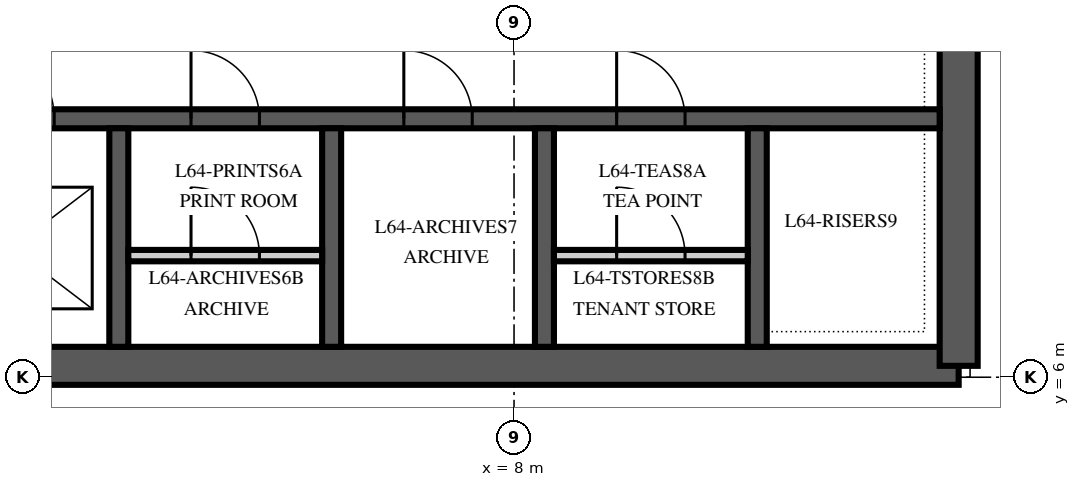
"""IFC4 building model, lengths in metres.
Left out: names, types, materials, properties, quantities, classifications, styles, units other than length and angle.
Written with IfcOpenShell. Run it as: python <this file> out.ifc"""

import sys

from ifc_helpers import new_model, si_unit, direction, frame, frame_2d, origin, place, context, subcontext, project, spatial, polyline, rectangle, outline, extrude, element, fill, save


model = new_model("IFC4")
c1 = context("Model", 3, precision=1e-05, world=origin(), true_north=direction((0.0, 1.0)))
c2 = subcontext(c1, "Body", "Model", "MODEL_VIEW")
j1 = project(units=[si_unit("LENGTHUNIT", "METRE"), si_unit("PLANEANGLEUNIT", "RADIAN")], contexts=[c1])
p1 = place(None, origin())
s1 = spatial("IfcSite", under=j1, at=p1, CompositionType="ELEMENT")
p2 = place(p1, origin())
s2 = spatial("IfcBuilding", under=s1, at=p2, CompositionType="ELEMENT")
p3 = place(p2, frame((0.0, 0.0, 276.0)))
s3 = spatial("IfcBuildingStorey", under=s2, at=p3, CompositionType="ELEMENT", Elevation=276.0)
p4 = place(p3, frame((-13.85, 6.15, 0.0), z_axis=(0.0, 0.0, 1.0), x_axis=(1.0, 0.0, 0.0)))
e1 = element("IfcWall", 1, at=p4, inside=s3, PredefinedType="SHEAR", context=c2, shape_type="SweptSolid", body=[
    extrude(rectangle(XDim=27.7, YDim=0.5, at=frame_2d((13.85, 0.0))), origin(), (0.0, 0.0, 1.0), 4.0),
])
p5 = place(p3, frame((13.85, 6.15, 0.0), z_axis=(0.0, 0.0, 1.0), x_axis=(0.0, 1.0, 0.0)))
e2 = element("IfcWall", 2, at=p5, inside=s3, PredefinedType="SHEAR", context=c2, shape_type="SweptSolid", body=[
    extrude(outline(polyline([(0.0, -0.25), (17.7, -0.25), (17.7, 0.0), (17.45, 0.0), (17.45, 0.25), (0.25, 0.25), (0.25, 0.0), (0.0, 0.0), (0.0, -0.25)])), origin(), (0.0, 0.0, 1.0), 4.0),
])
p6 = place(p5, frame((4.15, 0.0, 0.0)))
e3 = element("IfcOpeningElement", 3, at=p6, cuts=e2, PredefinedType="OPENING", context=c2, shape_type="SweptSolid", body=[
    extrude(rectangle(XDim=1.8, YDim=2.4, at=frame_2d((0.9, 1.2))), frame((0.0, 0.265, 0.0), z_axis=(0.0, -1.0, 0.0), x_axis=(1.0, 0.0, 0.0)), (0.0, 0.0, 1.0), 0.53),
])
p7 = place(p3, frame((-13.6, 9.4, 0.0), z_axis=(0.0, 0.0, 1.0), x_axis=(1.0, 0.0, 0.0)))
e4 = element("IfcWall", 4, at=p7, inside=s3, PredefinedType="SHEAR", context=c2, shape_type="SweptSolid", body=[
    extrude(rectangle(XDim=27.2, YDim=0.25, at=frame_2d((13.6, 0.0))), origin(), (0.0, 0.0, 1.0), 4.0),
])
p8 = place(p7, frame((8.85, 0.0, 0.0)))
e5 = element("IfcOpeningElement", 5, at=p8, cuts=e4, PredefinedType="OPENING", context=c2, shape_type="SweptSolid", body=[
    extrude(rectangle(XDim=1.1, YDim=2.1, at=frame_2d((0.55, 1.05))), frame((0.0, 0.14, 0.0), z_axis=(0.0, -1.0, 0.0), x_axis=(1.0, 0.0, 0.0)), (0.0, 0.0, 1.0), 0.28),
])
p9 = place(p7, frame((11.65, 0.0, 0.0)))
e6 = element("IfcOpeningElement", 6, at=p9, cuts=e4, PredefinedType="OPENING", context=c2, shape_type="SweptSolid", body=[
    extrude(rectangle(XDim=1.1, YDim=2.1, at=frame_2d((0.55, 1.05))), frame((0.0, 0.14, 0.0), z_axis=(0.0, -1.0, 0.0), x_axis=(1.0, 0.0, 0.0)), (0.0, 0.0, 1.0), 0.28),
])
p10 = place(p7, frame((14.45, 0.0, 0.0)))
e7 = element("IfcOpeningElement", 7, at=p10, cuts=e4, PredefinedType="OPENING", context=c2, shape_type="SweptSolid", body=[
    extrude(rectangle(XDim=1.1, YDim=2.1, at=frame_2d((0.55, 1.05))), frame((0.0, 0.14, 0.0), z_axis=(0.0, -1.0, 0.0), x_axis=(1.0, 0.0, 0.0)), (0.0, 0.0, 1.0), 0.28),
])
p11 = place(p7, frame((0.55, 0.0, 0.0)))
e8 = element("IfcOpeningElement", 8, at=p11, cuts=e4, PredefinedType="OPENING", context=c2, shape_type="SweptSolid", body=[
    extrude(rectangle(XDim=0.9, YDim=2.1, at=frame_2d((0.45, 1.05))), frame((0.0, 0.14, 0.0), z_axis=(0.0, -1.0, 0.0), x_axis=(1.0, 0.0, 0.0)), (0.0, 0.0, 1.0), 0.28),
])
p12 = place(p7, frame((3.35, 0.0, 0.0)))
e9 = element("IfcOpeningElement", 9, at=p12, cuts=e4, PredefinedType="OPENING", context=c2, shape_type="SweptSolid", body=[
    extrude(rectangle(XDim=0.9, YDim=2.1, at=frame_2d((0.45, 1.05))), frame((0.0, 0.14, 0.0), z_axis=(0.0, -1.0, 0.0), x_axis=(1.0, 0.0, 0.0)), (0.0, 0.0, 1.0), 0.28),
])
p13 = place(p7, frame((6.15, 0.0, 0.0)))
e10 = element("IfcOpeningElement", 10, at=p13, cuts=e4, PredefinedType="OPENING", context=c2, shape_type="SweptSolid", body=[
    extrude(rectangle(XDim=0.9, YDim=2.1, at=frame_2d((0.45, 1.05))), frame((0.0, 0.14, 0.0), z_axis=(0.0, -1.0, 0.0), x_axis=(1.0, 0.0, 0.0)), (0.0, 0.0, 1.0), 0.28),
])
p14 = place(p7, frame((17.35, 0.0, 0.0)))
e11 = element("IfcOpeningElement", 11, at=p14, cuts=e4, PredefinedType="OPENING", context=c2, shape_type="SweptSolid", body=[
    extrude(rectangle(XDim=0.9, YDim=2.1, at=frame_2d((0.45, 1.05))), frame((0.0, 0.14, 0.0), z_axis=(0.0, -1.0, 0.0), x_axis=(1.0, 0.0, 0.0)), (0.0, 0.0, 1.0), 0.28),
])
p15 = place(p7, frame((20.15, 0.0, 0.0)))
e12 = element("IfcOpeningElement", 12, at=p15, cuts=e4, PredefinedType="OPENING", context=c2, shape_type="SweptSolid", body=[
    extrude(rectangle(XDim=0.9, YDim=2.1, at=frame_2d((0.45, 1.05))), frame((0.0, 0.14, 0.0), z_axis=(0.0, -1.0, 0.0), x_axis=(1.0, 0.0, 0.0)), (0.0, 0.0, 1.0), 0.28),
])
p16 = place(p7, frame((22.95, 0.0, 0.0)))
e13 = element("IfcOpeningElement", 13, at=p16, cuts=e4, PredefinedType="OPENING", context=c2, shape_type="SweptSolid", body=[
    extrude(rectangle(XDim=0.9, YDim=2.1, at=frame_2d((0.45, 1.05))), frame((0.0, 0.14, 0.0), z_axis=(0.0, -1.0, 0.0), x_axis=(1.0, 0.0, 0.0)), (0.0, 0.0, 1.0), 0.28),
])
for number, where, z_axis, x_axis in (
    (14, (2.8, 6.4, 0.0), (0.0, 0.0, 1.0), (0.0, 1.0, 0.0)),
    (15, (5.6, 6.4, 0.0), (0.0, 0.0, 1.0), (0.0, 1.0, 0.0)),
    (16, (8.4, 6.4, 0.0), (0.0, 0.0, 1.0), (0.0, 1.0, 0.0)),
    (17, (11.2, 6.4, 0.0), (0.0, 0.0, 1.0), (0.0, 1.0, 0.0)),
):
    element("IfcWall", number, at=place(p3, frame(where, z_axis=z_axis, x_axis=x_axis)), inside=s3, PredefinedType="SHEAR", context=c2, shape_type="SweptSolid", body=[
        extrude(rectangle(XDim=2.875, YDim=0.25, at=frame_2d((1.438, 0.0))), origin(), (0.0, 0.0, 1.0), 4.0),
    ])
p17 = place(p3, frame((2.925, 7.6, 0.0), z_axis=(0.0, 0.0, 1.0), x_axis=(1.0, 0.0, 0.0)))
e18 = element("IfcWall", 18, at=p17, inside=s3, PredefinedType="PARTITIONING", context=c2, shape_type="SweptSolid", body=[
    extrude(rectangle(XDim=2.55, YDim=0.15, at=frame_2d((1.275, 0.0))), origin(), (0.0, 0.0, 1.0), 3.85),
])
p18 = place(p17, frame((0.825, 0.0, 0.0)))
e19 = element("IfcOpeningElement", 19, at=p18, cuts=e18, PredefinedType="OPENING", context=c2, shape_type="SweptSolid", body=[
    extrude(rectangle(XDim=0.9, YDim=2.1, at=frame_2d((0.45, 1.05))), frame((0.0, 0.09, 0.0), z_axis=(0.0, -1.0, 0.0), x_axis=(1.0, 0.0, 0.0)), (0.0, 0.0, 1.0), 0.18),
])
p19 = place(p3, frame((8.525, 7.6, 0.0), z_axis=(0.0, 0.0, 1.0), x_axis=(1.0, 0.0, 0.0)))
e20 = element("IfcWall", 20, at=p19, inside=s3, PredefinedType="PARTITIONING", context=c2, shape_type="SweptSolid", body=[
    extrude(rectangle(XDim=2.55, YDim=0.15, at=frame_2d((1.275, 0.0))), origin(), (0.0, 0.0, 1.0), 3.85),
])
p20 = place(p19, frame((0.825, 0.0, 0.0)))
e21 = element("IfcOpeningElement", 21, at=p20, cuts=e20, PredefinedType="OPENING", context=c2, shape_type="SweptSolid", body=[
    extrude(rectangle(XDim=0.9, YDim=2.1, at=frame_2d((0.45, 1.05))), frame((0.0, 0.09, 0.0), z_axis=(0.0, -1.0, 0.0), x_axis=(1.0, 0.0, 0.0)), (0.0, 0.0, 1.0), 0.18),
])
p21 = place(p10, origin())
e22 = element("IfcDoor", 22, at=p21, inside=s3, OperationType="SLIDING_TO_LEFT", PredefinedType="DOOR", context=c2, shape_type="SweptSolid", body=[
    extrude(rectangle(XDim=1.1, YDim=2.1, at=frame_2d((0.55, 1.05))), frame((0.0, 0.125, 0.0), z_axis=(0.0, -1.0, 0.0), x_axis=(1.0, 0.0, 0.0)), (0.0, 0.0, 1.0), 0.25),
])
fill(e7, e22)
p22 = place(p14, origin())
e23 = element("IfcDoor", 23, at=p22, inside=s3, OperationType="SINGLE_SWING_LEFT", PredefinedType="DOOR", context=c2, shape_type="SweptSolid", body=[
    extrude(rectangle(XDim=0.9, YDim=2.1, at=frame_2d((0.45, 1.05))), frame((0.0, 0.125, 0.0), z_axis=(0.0, -1.0, 0.0), x_axis=(1.0, 0.0, 0.0)), (0.0, 0.0, 1.0), 0.25),
])
fill(e11, e23)
p23 = place(p18, origin())
e24 = element("IfcDoor", 24, at=p23, inside=s3, OperationType="SINGLE_SWING_LEFT", PredefinedType="DOOR", context=c2, shape_type="SweptSolid", body=[
    extrude(rectangle(XDim=0.9, YDim=2.1, at=frame_2d((0.45, 1.05))), frame((0.0, 0.075, 0.0), z_axis=(0.0, -1.0, 0.0), x_axis=(1.0, 0.0, 0.0)), (0.0, 0.0, 1.0), 0.149),
])
fill(e19, e24)
p24 = place(p15, origin())
e25 = element("IfcDoor", 25, at=p24, inside=s3, OperationType="SINGLE_SWING_LEFT", PredefinedType="DOOR", context=c2, shape_type="SweptSolid", body=[
    extrude(rectangle(XDim=0.9, YDim=2.1, at=frame_2d((0.45, 1.05))), frame((0.0, 0.125, 0.0), z_axis=(0.0, -1.0, 0.0), x_axis=(1.0, 0.0, 0.0)), (0.0, 0.0, 1.0), 0.25),
])
fill(e12, e25)
p25 = place(p16, origin())
e26 = element("IfcDoor", 26, at=p25, inside=s3, OperationType="SINGLE_SWING_LEFT", PredefinedType="DOOR", context=c2, shape_type="SweptSolid", body=[
    extrude(rectangle(XDim=0.9, YDim=2.1, at=frame_2d((0.45, 1.05))), frame((0.0, 0.125, 0.0), z_axis=(0.0, -1.0, 0.0), x_axis=(1.0, 0.0, 0.0)), (0.0, 0.0, 1.0), 0.25),
])
fill(e13, e26)
p26 = place(p20, origin())
e27 = element("IfcDoor", 27, at=p26, inside=s3, OperationType="SINGLE_SWING_LEFT", PredefinedType="DOOR", context=c2, shape_type="SweptSolid", body=[
    extrude(rectangle(XDim=0.9, YDim=2.1, at=frame_2d((0.45, 1.05))), frame((0.0, 0.075, 0.0), z_axis=(0.0, -1.0, 0.0), x_axis=(1.0, 0.0, 0.0)), (0.0, 0.0, 1.0), 0.149),
])
fill(e21, e27)
save(model, sys.argv[1])
